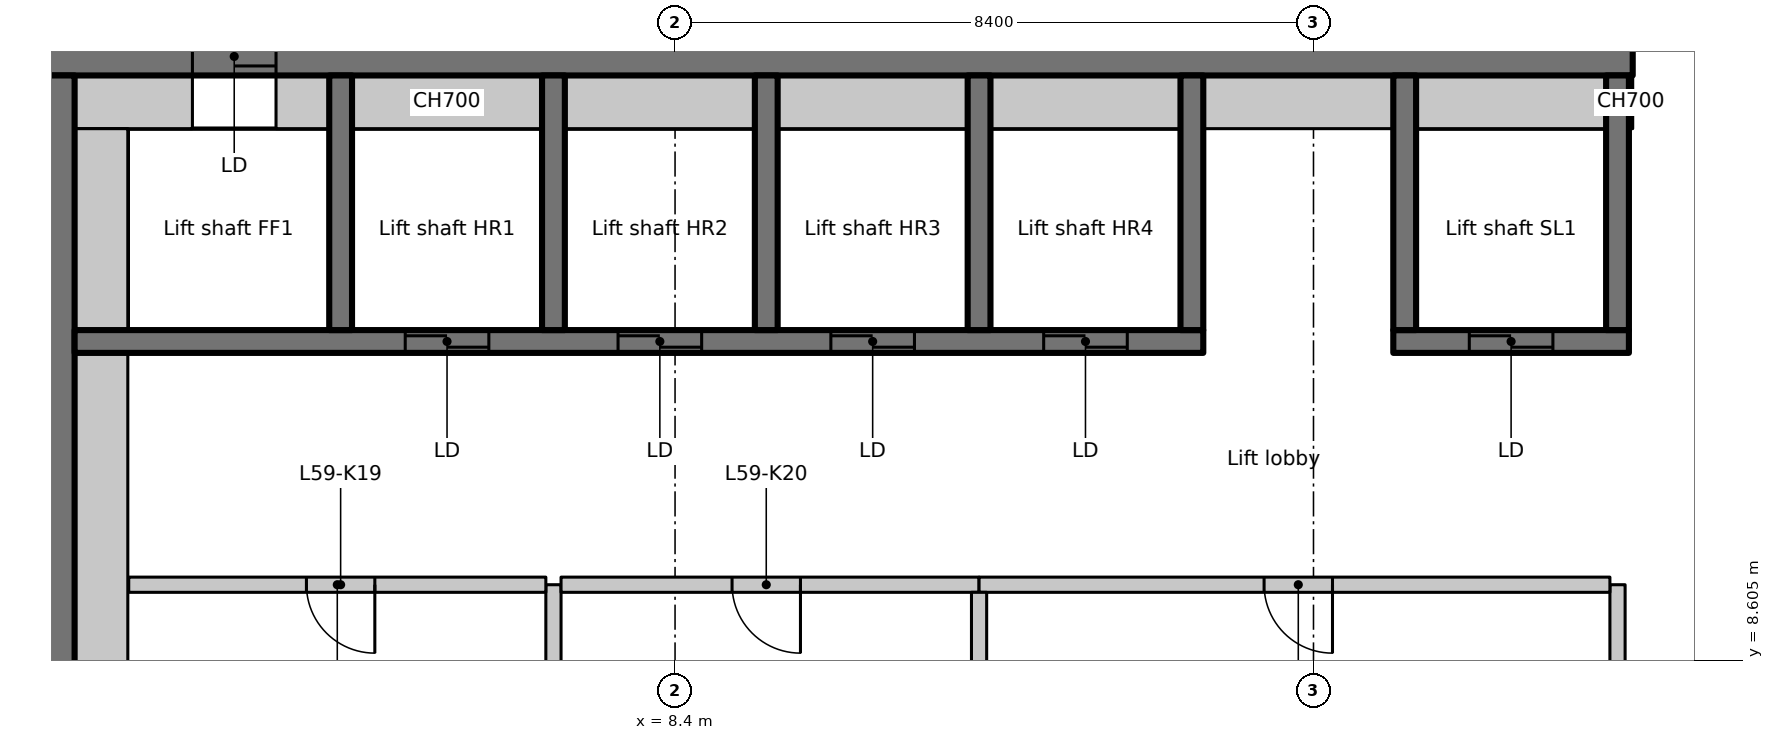
"""IFC4 building model, lengths in metres.
Left out: names, types, materials, properties, quantities, classifications, styles, units other than length and angle.
Written with IfcOpenShell. Run it as: python <this file> out.ifc"""

import sys

from ifc_helpers import new_model, si_unit, direction, frame, frame_2d, origin, place, context, subcontext, project, spatial, rectangle, extrude, element, fill, save


model = new_model("IFC4")
c1 = context("Model", 3, precision=1e-05, world=origin(), true_north=direction((0.0, 1.0)))
c2 = subcontext(c1, "Body", "Model", "MODEL_VIEW")
j1 = project(units=[si_unit("LENGTHUNIT", "METRE"), si_unit("PLANEANGLEUNIT", "RADIAN")], contexts=[c1])
p1 = place(None, origin())
s1 = spatial("IfcSite", under=j1, at=p1, CompositionType="ELEMENT")
p2 = place(p1, origin())
s2 = spatial("IfcBuilding", under=s1, at=p2, CompositionType="ELEMENT")
p3 = place(p2, frame((0.0, 0.0, 233.7)))
s3 = spatial("IfcBuildingStorey", under=s2, at=p3, CompositionType="ELEMENT", Elevation=233.7)
p4 = place(p3, frame((-1.1, 16.55, 0.0), z_axis=(0.0, 0.0, 1.0), x_axis=(1.0, 0.0, 0.0)))
e1 = element("IfcWall", 1, at=p4, inside=s3, PredefinedType="SHEAR", context=c2, shape_type="SweptSolid", body=[
    extrude(rectangle(XDim=22.1, YDim=0.5, at=frame_2d((11.05, 0.0))), origin(), (0.0, 0.0, 1.0), 3.35),
])
p5 = place(p4, frame((3.15, 0.0, 0.0)))
e2 = element("IfcOpeningElement", 2, at=p5, cuts=e1, PredefinedType="OPENING", context=c2, shape_type="SweptSolid", body=[
    extrude(rectangle(XDim=1.1, YDim=2.3, at=frame_2d((0.55, 1.15))), frame((0.0, 0.26, 0.0), z_axis=(0.0, -1.0, 0.0), x_axis=(1.0, 0.0, 0.0)), (0.0, 0.0, 1.0), 0.52),
])
p6 = place(p3, frame((0.25, 7.436, 0.0), z_axis=(0.0, 0.0, 1.0), x_axis=(0.0, 1.0, 0.0)))
e3 = element("IfcWall", 3, at=p6, inside=s3, PredefinedType="SHEAR", context=c2, shape_type="SweptSolid", body=[
    extrude(rectangle(XDim=8.864, YDim=0.5, at=frame_2d((4.432, 0.0))), origin(), (0.0, 0.0, 1.0), 3.35),
])
p7 = place(p3, frame((0.5, 15.95, 0.0), z_axis=(0.0, 0.0, 1.0), x_axis=(1.0, 0.0, 0.0)))
e4 = element("IfcWall", 4, at=p7, inside=s3, PredefinedType="PARTITIONING", context=c2, shape_type="SweptSolid", body=[
    extrude(rectangle(XDim=1.55, YDim=0.7, at=frame_2d((0.775, 0.0))), origin(), (0.0, 0.0, 1.0), 3.35),
])
p8 = place(p3, frame((0.5, 12.8, 0.0), z_axis=(0.0, 0.0, 1.0), x_axis=(1.0, 0.0, 0.0)))
e5 = element("IfcWall", 5, at=p8, inside=s3, PredefinedType="SHEAR", context=c2, shape_type="SweptSolid", body=[
    extrude(rectangle(XDim=14.85, YDim=0.3, at=frame_2d((7.425, 0.0))), origin(), (0.0, 0.0, 1.0), 3.35),
])
p9 = place(p8, frame((4.35, 0.0, 0.0)))
e6 = element("IfcOpeningElement", 6, at=p9, cuts=e5, PredefinedType="OPENING", context=c2, shape_type="SweptSolid", body=[
    extrude(rectangle(XDim=1.1, YDim=2.3, at=frame_2d((0.55, 1.15))), frame((0.0, 0.16, 0.0), z_axis=(0.0, -1.0, 0.0), x_axis=(1.0, 0.0, 0.0)), (0.0, 0.0, 1.0), 0.32),
])
p10 = place(p8, frame((7.15, 0.0, 0.0)))
e7 = element("IfcOpeningElement", 7, at=p10, cuts=e5, PredefinedType="OPENING", context=c2, shape_type="SweptSolid", body=[
    extrude(rectangle(XDim=1.1, YDim=2.3, at=frame_2d((0.55, 1.15))), frame((0.0, 0.16, 0.0), z_axis=(0.0, -1.0, 0.0), x_axis=(1.0, 0.0, 0.0)), (0.0, 0.0, 1.0), 0.32),
])
p11 = place(p8, frame((9.95, 0.0, 0.0)))
e8 = element("IfcOpeningElement", 8, at=p11, cuts=e5, PredefinedType="OPENING", context=c2, shape_type="SweptSolid", body=[
    extrude(rectangle(XDim=1.1, YDim=2.3, at=frame_2d((0.55, 1.15))), frame((0.0, 0.16, 0.0), z_axis=(0.0, -1.0, 0.0), x_axis=(1.0, 0.0, 0.0)), (0.0, 0.0, 1.0), 0.32),
])
p12 = place(p8, frame((12.75, 0.0, 0.0)))
e9 = element("IfcOpeningElement", 9, at=p12, cuts=e5, PredefinedType="OPENING", context=c2, shape_type="SweptSolid", body=[
    extrude(rectangle(XDim=1.1, YDim=2.3, at=frame_2d((0.55, 1.15))), frame((0.0, 0.16, 0.0), z_axis=(0.0, -1.0, 0.0), x_axis=(1.0, 0.0, 0.0)), (0.0, 0.0, 1.0), 0.32),
])
for number, where, z_axis, x_axis in (
    (10, (4.0, 12.95, 0.0), (0.0, 0.0, 1.0), (0.0, 1.0, 0.0)),
    (11, (6.8, 12.95, 0.0), (0.0, 0.0, 1.0), (0.0, 1.0, 0.0)),
    (12, (9.6, 12.95, 0.0), (0.0, 0.0, 1.0), (0.0, 1.0, 0.0)),
    (13, (12.4, 12.95, 0.0), (0.0, 0.0, 1.0), (0.0, 1.0, 0.0)),
    (14, (15.2, 12.95, 0.0), (0.0, 0.0, 1.0), (0.0, 1.0, 0.0)),
):
    element("IfcWall", number, at=place(p3, frame(where, z_axis=z_axis, x_axis=x_axis)), inside=s3, PredefinedType="SHEAR", context=c2, shape_type="SweptSolid", body=[
        extrude(rectangle(XDim=3.35, YDim=0.3, at=frame_2d((1.675, 0.0))), origin(), (0.0, 0.0, 1.0), 3.35),
    ])
p13 = place(p3, frame((17.85, 12.8, 0.0), z_axis=(0.0, 0.0, 1.0), x_axis=(1.0, 0.0, 0.0)))
e15 = element("IfcWall", 15, at=p13, inside=s3, PredefinedType="SHEAR", context=c2, shape_type="SweptSolid", body=[
    extrude(rectangle(XDim=3.1, YDim=0.3, at=frame_2d((1.55, 0.0))), origin(), (0.0, 0.0, 1.0), 3.35),
])
p14 = place(p13, frame((1.0, 0.0, 0.0)))
e16 = element("IfcOpeningElement", 16, at=p14, cuts=e15, PredefinedType="OPENING", context=c2, shape_type="SweptSolid", body=[
    extrude(rectangle(XDim=1.1, YDim=2.3, at=frame_2d((0.55, 1.15))), frame((0.0, 0.16, 0.0), z_axis=(0.0, -1.0, 0.0), x_axis=(1.0, 0.0, 0.0)), (0.0, 0.0, 1.0), 0.32),
])
for number, where, z_axis, x_axis in (
    (17, (18.0, 12.95, 0.0), (0.0, 0.0, 1.0), (0.0, 1.0, 0.0)),
    (18, (20.8, 12.95, 0.0), (0.0, 0.0, 1.0), (0.0, 1.0, 0.0)),
):
    element("IfcWall", number, at=place(p3, frame(where, z_axis=z_axis, x_axis=x_axis)), inside=s3, PredefinedType="SHEAR", context=c2, shape_type="SweptSolid", body=[
        extrude(rectangle(XDim=3.35, YDim=0.3, at=frame_2d((1.675, 0.0))), origin(), (0.0, 0.0, 1.0), 3.35),
    ])
p15 = place(p3, frame((6.8, 9.6, 0.0), z_axis=(0.0, 0.0, 1.0), x_axis=(0.0, -1.0, 0.0)))
e19 = element("IfcWall", 19, at=p15, inside=s3, PredefinedType="PARTITIONING", context=c2, shape_type="SweptSolid", body=[
    extrude(rectangle(XDim=2.5, YDim=0.2, at=frame_2d((1.25, 0.0))), origin(), (0.0, 0.0, 1.0), 3.35),
])
p16 = place(p3, frame((6.7, 9.6, 0.0), z_axis=(0.0, 0.0, 1.0), x_axis=(-1.0, 0.0, 0.0)))
e20 = element("IfcWall", 20, at=p16, inside=s3, PredefinedType="PARTITIONING", context=c2, shape_type="SweptSolid", body=[
    extrude(rectangle(XDim=5.488, YDim=0.2, at=frame_2d((2.744, 0.0))), origin(), (0.0, 0.0, 1.0), 3.35),
])
p17 = place(p16, frame((2.25, 0.0, 0.0)))
e21 = element("IfcOpeningElement", 21, at=p17, cuts=e20, PredefinedType="OPENING", context=c2, shape_type="SweptSolid", body=[
    extrude(rectangle(XDim=0.9, YDim=2.1, at=frame_2d((0.45, 1.05))), frame((0.0, 0.11, 0.0), z_axis=(0.0, -1.0, 0.0), x_axis=(1.0, 0.0, 0.0)), (0.0, 0.0, 1.0), 0.22),
])
p18 = place(p3, frame((12.4, 9.6, 0.0), z_axis=(0.0, 0.0, 1.0), x_axis=(-1.0, 0.0, 0.0)))
e22 = element("IfcWall", 22, at=p18, inside=s3, PredefinedType="PARTITIONING", context=c2, shape_type="SweptSolid", body=[
    extrude(rectangle(XDim=5.5, YDim=0.2, at=frame_2d((2.75, 0.0))), origin(), (0.0, 0.0, 1.0), 3.35),
])
p19 = place(p18, frame((2.35, 0.0, 0.0)))
e23 = element("IfcOpeningElement", 23, at=p19, cuts=e22, PredefinedType="OPENING", context=c2, shape_type="SweptSolid", body=[
    extrude(rectangle(XDim=0.9, YDim=2.1, at=frame_2d((0.45, 1.05))), frame((0.0, 0.11, 0.0), z_axis=(0.0, -1.0, 0.0), x_axis=(1.0, 0.0, 0.0)), (0.0, 0.0, 1.0), 0.22),
])
p20 = place(p3, frame((20.8, 7.1, 0.0), z_axis=(0.0, 0.0, 1.0), x_axis=(0.0, 1.0, 0.0)))
e24 = element("IfcWall", 24, at=p20, inside=s3, PredefinedType="PARTITIONING", context=c2, shape_type="SweptSolid", body=[
    extrude(rectangle(XDim=2.5, YDim=0.2, at=frame_2d((1.25, 0.0))), origin(), (0.0, 0.0, 1.0), 3.35),
])
p21 = place(p3, frame((20.7, 9.6, 0.0), z_axis=(0.0, 0.0, 1.0), x_axis=(-1.0, 0.0, 0.0)))
e25 = element("IfcWall", 25, at=p21, inside=s3, PredefinedType="PARTITIONING", context=c2, shape_type="SweptSolid", body=[
    extrude(rectangle(XDim=8.3, YDim=0.2, at=frame_2d((4.15, 0.0))), origin(), (0.0, 0.0, 1.0), 3.35),
])
p22 = place(p21, frame((3.65, 0.0, 0.0)))
e26 = element("IfcOpeningElement", 26, at=p22, cuts=e25, PredefinedType="OPENING", context=c2, shape_type="SweptSolid", body=[
    extrude(rectangle(XDim=0.9, YDim=2.1, at=frame_2d((0.45, 1.05))), frame((0.0, 0.11, 0.0), z_axis=(0.0, -1.0, 0.0), x_axis=(1.0, 0.0, 0.0)), (0.0, 0.0, 1.0), 0.22),
])
p23 = place(p3, frame((12.4, 9.5, 0.0), z_axis=(0.0, 0.0, 1.0), x_axis=(0.0, -1.0, 0.0)))
e27 = element("IfcWall", 27, at=p23, inside=s3, PredefinedType="PARTITIONING", context=c2, shape_type="SweptSolid", body=[
    extrude(rectangle(XDim=2.4, YDim=0.2, at=frame_2d((1.2, 0.0))), origin(), (0.0, 0.0, 1.0), 3.35),
])
p24 = place(p3, frame((0.85, 7.436, 0.0), z_axis=(0.0, 0.0, 1.0), x_axis=(0.0, 1.0, 0.0)))
e28 = element("IfcWall", 28, at=p24, inside=s3, PredefinedType="PARTITIONING", context=c2, shape_type="SweptSolid", body=[
    extrude(rectangle(XDim=5.214, YDim=0.7, at=frame_2d((2.607, 0.0))), origin(), (0.0, 0.0, 1.0), 3.35),
])
p25 = place(p3, frame((0.85, 12.95, 0.0), z_axis=(0.0, 0.0, 1.0), x_axis=(0.0, 1.0, 0.0)))
e29 = element("IfcWall", 29, at=p25, inside=s3, PredefinedType="PARTITIONING", context=c2, shape_type="SweptSolid", body=[
    extrude(rectangle(XDim=2.65, YDim=0.7, at=frame_2d((1.325, 0.0))), origin(), (0.0, 0.0, 1.0), 3.35),
])
p26 = place(p3, frame((3.15, 15.95, 0.0), z_axis=(0.0, 0.0, 1.0), x_axis=(1.0, 0.0, 0.0)))
e30 = element("IfcWall", 30, at=p26, inside=s3, PredefinedType="PARTITIONING", context=c2, shape_type="SweptSolid", body=[
    extrude(rectangle(XDim=0.7, YDim=0.7, at=frame_2d((0.35, 0.0))), origin(), (0.0, 0.0, 1.0), 3.35),
])
for number, where, z_axis, x_axis in (
    (31, (4.15, 15.95, 0.0), (0.0, 0.0, 1.0), (1.0, 0.0, 0.0)),
    (32, (6.95, 15.95, 0.0), (0.0, 0.0, 1.0), (1.0, 0.0, 0.0)),
    (33, (9.75, 15.95, 0.0), (0.0, 0.0, 1.0), (1.0, 0.0, 0.0)),
    (34, (12.55, 15.95, 0.0), (0.0, 0.0, 1.0), (1.0, 0.0, 0.0)),
    (35, (15.35, 15.95, 0.0), (0.0, 0.0, 1.0), (1.0, 0.0, 0.0)),
    (36, (18.15, 15.95, 0.0), (0.0, 0.0, 1.0), (1.0, 0.0, 0.0)),
):
    element("IfcWall", number, at=place(p3, frame(where, z_axis=z_axis, x_axis=x_axis)), inside=s3, PredefinedType="PARTITIONING", context=c2, shape_type="SweptSolid", body=[
        extrude(rectangle(XDim=2.5, YDim=0.7, at=frame_2d((1.25, 0.0))), origin(), (0.0, 0.0, 1.0), 3.35),
    ])
p27 = place(p3, frame((20.95, 15.95, 0.0), z_axis=(0.0, 0.0, 1.0), x_axis=(1.0, 0.0, 0.0)))
e37 = element("IfcWall", 37, at=p27, inside=s3, PredefinedType="PARTITIONING", context=c2, shape_type="SweptSolid", body=[
    extrude(rectangle(XDim=0.05, YDim=0.7, at=frame_2d((0.025, 0.0))), origin(), (0.0, 0.0, 1.0), 3.35),
])
p28 = place(p5, origin())
e38 = element("IfcDoor", 38, at=p28, inside=s3, OperationType="SLIDING_TO_LEFT", PredefinedType="DOOR", context=c2, shape_type="SweptSolid", body=[
    extrude(rectangle(XDim=1.1, YDim=2.3, at=frame_2d((0.55, 1.15))), frame((0.0, 0.025, 0.0), z_axis=(0.0, -1.0, 0.0), x_axis=(1.0, 0.0, 0.0)), (0.0, 0.0, 1.0), 0.05),
])
fill(e2, e38)
p29 = place(p9, origin())
e39 = element("IfcDoor", 39, at=p29, inside=s3, OperationType="SLIDING_TO_LEFT", PredefinedType="DOOR", context=c2, shape_type="SweptSolid", body=[
    extrude(rectangle(XDim=1.1, YDim=2.3, at=frame_2d((0.55, 1.15))), frame((0.0, 0.025, 0.0), z_axis=(0.0, -1.0, 0.0), x_axis=(1.0, 0.0, 0.0)), (0.0, 0.0, 1.0), 0.05),
])
fill(e6, e39)
p30 = place(p10, origin())
e40 = element("IfcDoor", 40, at=p30, inside=s3, OperationType="SLIDING_TO_LEFT", PredefinedType="DOOR", context=c2, shape_type="SweptSolid", body=[
    extrude(rectangle(XDim=1.1, YDim=2.3, at=frame_2d((0.55, 1.15))), frame((0.0, 0.025, 0.0), z_axis=(0.0, -1.0, 0.0), x_axis=(1.0, 0.0, 0.0)), (0.0, 0.0, 1.0), 0.05),
])
fill(e7, e40)
p31 = place(p11, origin())
e41 = element("IfcDoor", 41, at=p31, inside=s3, OperationType="SLIDING_TO_LEFT", PredefinedType="DOOR", context=c2, shape_type="SweptSolid", body=[
    extrude(rectangle(XDim=1.1, YDim=2.3, at=frame_2d((0.55, 1.15))), frame((0.0, 0.025, 0.0), z_axis=(0.0, -1.0, 0.0), x_axis=(1.0, 0.0, 0.0)), (0.0, 0.0, 1.0), 0.05),
])
fill(e8, e41)
p32 = place(p12, origin())
e42 = element("IfcDoor", 42, at=p32, inside=s3, OperationType="SLIDING_TO_LEFT", PredefinedType="DOOR", context=c2, shape_type="SweptSolid", body=[
    extrude(rectangle(XDim=1.1, YDim=2.3, at=frame_2d((0.55, 1.15))), frame((0.0, 0.025, 0.0), z_axis=(0.0, -1.0, 0.0), x_axis=(1.0, 0.0, 0.0)), (0.0, 0.0, 1.0), 0.05),
])
fill(e9, e42)
p33 = place(p14, origin())
e43 = element("IfcDoor", 43, at=p33, inside=s3, OperationType="SLIDING_TO_LEFT", PredefinedType="DOOR", context=c2, shape_type="SweptSolid", body=[
    extrude(rectangle(XDim=1.1, YDim=2.3, at=frame_2d((0.55, 1.15))), frame((0.0, 0.025, 0.0), z_axis=(0.0, -1.0, 0.0), x_axis=(1.0, 0.0, 0.0)), (0.0, 0.0, 1.0), 0.05),
])
fill(e16, e43)
p34 = place(p17, origin())
e44 = element("IfcDoor", 44, at=p34, inside=s3, OperationType="SINGLE_SWING_RIGHT", PredefinedType="DOOR", context=c2, shape_type="SweptSolid", body=[
    extrude(rectangle(XDim=0.9, YDim=2.1, at=frame_2d((0.45, 1.05))), frame((0.0, 0.025, 0.0), z_axis=(0.0, -1.0, 0.0), x_axis=(1.0, 0.0, 0.0)), (0.0, 0.0, 1.0), 0.05),
])
fill(e21, e44)
p35 = place(p19, origin())
e45 = element("IfcDoor", 45, at=p35, inside=s3, OperationType="SINGLE_SWING_LEFT", PredefinedType="DOOR", context=c2, shape_type="SweptSolid", body=[
    extrude(rectangle(XDim=0.9, YDim=2.1, at=frame_2d((0.45, 1.05))), frame((0.0, 0.025, 0.0), z_axis=(0.0, -1.0, 0.0), x_axis=(1.0, 0.0, 0.0)), (0.0, 0.0, 1.0), 0.05),
])
fill(e23, e45)
p36 = place(p22, origin())
e46 = element("IfcDoor", 46, at=p36, inside=s3, OperationType="SINGLE_SWING_RIGHT", PredefinedType="DOOR", context=c2, shape_type="SweptSolid", body=[
    extrude(rectangle(XDim=0.9, YDim=2.1, at=frame_2d((0.45, 1.05))), frame((0.0, 0.025, 0.0), z_axis=(0.0, -1.0, 0.0), x_axis=(1.0, 0.0, 0.0)), (0.0, 0.0, 1.0), 0.05),
])
fill(e26, e46)
save(model, sys.argv[1])
